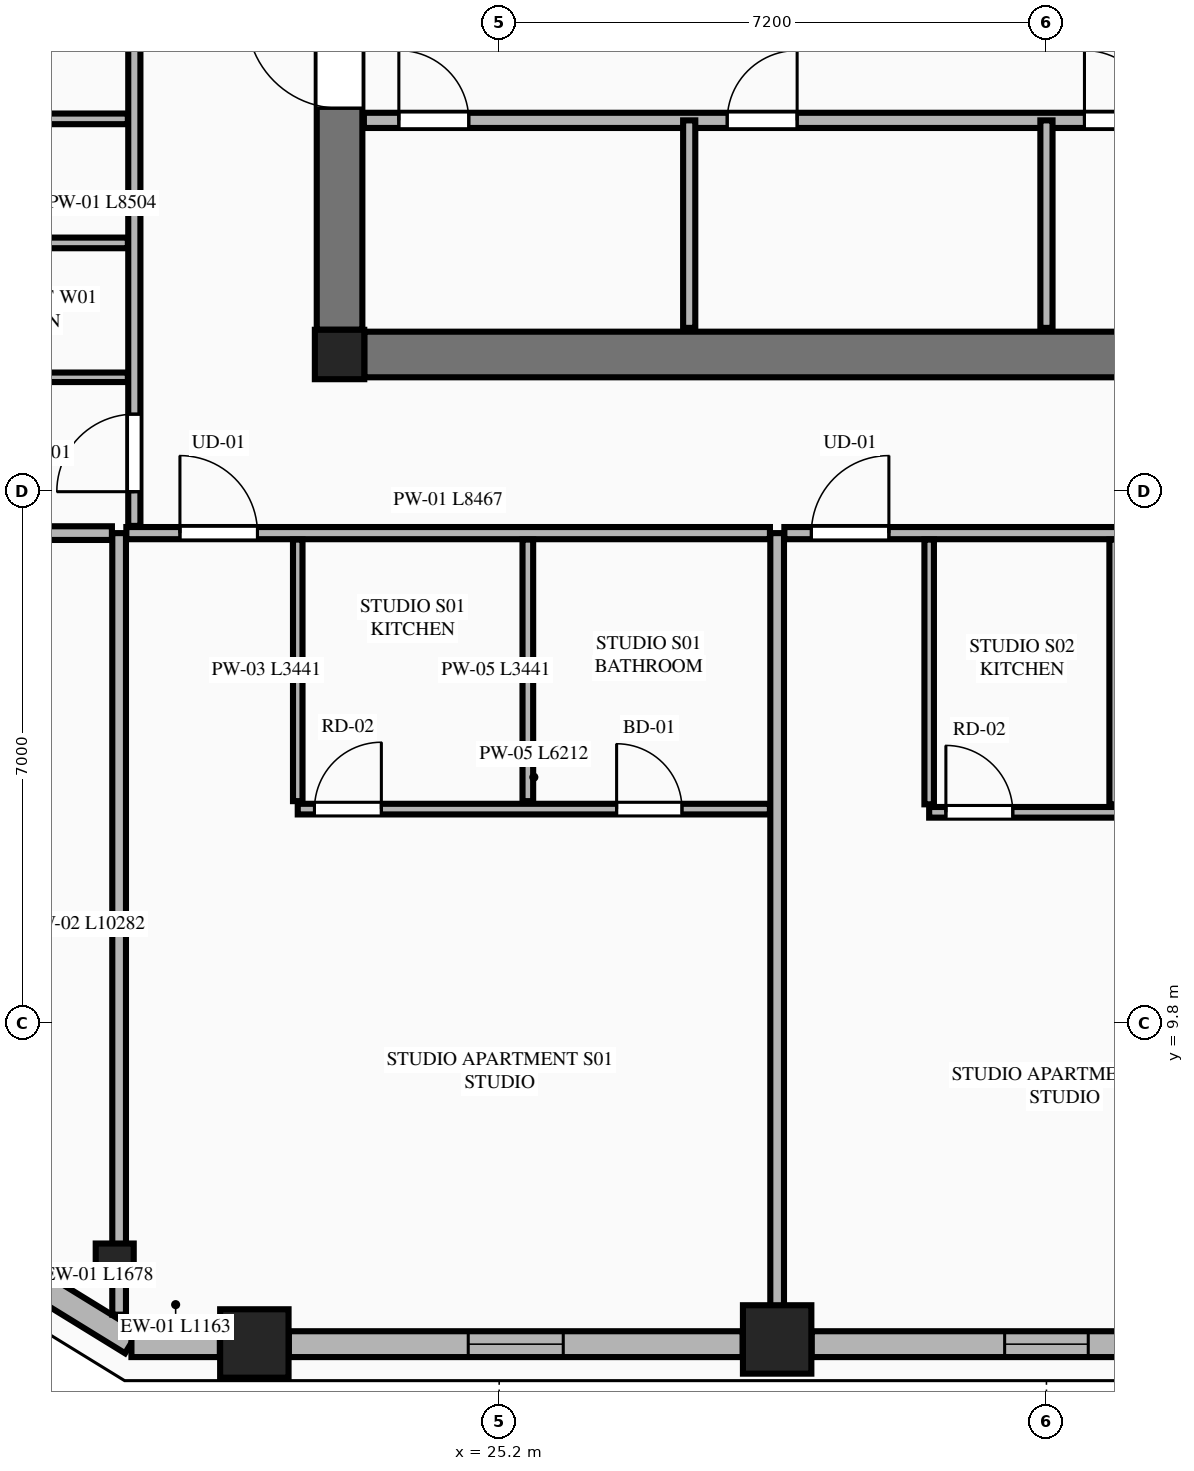
"""IFC4 building model, lengths in metres.
Left out: names, types, materials, properties, quantities, classifications, styles, units other than length and angle.
Written with IfcOpenShell. Run it as: python <this file> out.ifc"""

import sys

from ifc_helpers import new_model, si_unit, direction, frame, frame_2d, origin, origin_2d, place, context, subcontext, project, spatial, rectangle, extrude, element, fill, save


model = new_model("IFC4")
c1 = context("Model", 3, precision=1e-05, world=origin(), true_north=direction((0.0, 1.0)))
c2 = subcontext(c1, "Body", "Model", "MODEL_VIEW")
j1 = project(units=[si_unit("LENGTHUNIT", "METRE"), si_unit("PLANEANGLEUNIT", "RADIAN")], contexts=[c1])
p1 = place(None, origin())
s1 = spatial("IfcSite", under=j1, at=p1, CompositionType="ELEMENT")
p2 = place(p1, origin())
s2 = spatial("IfcBuilding", under=s1, at=p2, CompositionType="ELEMENT")
p3 = place(p2, frame((0.0, 0.0, 189.65)))
s3 = spatial("IfcBuildingStorey", under=s2, at=p3, CompositionType="ELEMENT", Elevation=189.65)
p4 = place(p3, frame((23.1, 18.6, 0.0), z_axis=(0.0, 0.0, 1.0), x_axis=(1.0, 0.0, 0.0)))
e1 = element("IfcColumn", 1, at=p4, inside=s3, PredefinedType="COLUMN", context=c2, shape_type="SweptSolid", body=[
    extrude(rectangle(XDim=0.65, YDim=0.65, at=origin_2d()), origin(), (0.0, 0.0, 1.0), 3.55),
])
p5 = place(p3, frame((23.425, 18.6, 0.0), z_axis=(0.0, 0.0, 1.0), x_axis=(1.0, 0.0, 0.0)))
e2 = element("IfcWall", 2, at=p5, inside=s3, PredefinedType="SHEAR", context=c2, shape_type="SweptSolid", body=[
    extrude(rectangle(XDim=17.95, YDim=0.6, at=frame_2d((8.975, 0.0))), origin(), (0.0, 0.0, 1.0), 3.35),
])
p6 = place(p3, frame((23.1, 18.925, 0.0), z_axis=(0.0, 0.0, 1.0), x_axis=(0.0, 1.0, 0.0)))
e3 = element("IfcWall", 3, at=p6, inside=s3, PredefinedType="SHEAR", context=c2, shape_type="SweptSolid", body=[
    extrude(rectangle(XDim=13.95, YDim=0.6, at=frame_2d((6.975, 0.0))), origin(), (0.0, 0.0, 1.0), 3.35),
])
p7 = place(p6, frame((2.915, 0.0, 0.0)))
e4 = element("IfcOpeningElement", 4, at=p7, cuts=e3, PredefinedType="OPENING", context=c2, shape_type="SweptSolid", body=[
    extrude(rectangle(XDim=1.22, YDim=2.25, at=frame_2d((0.61, 1.125))), frame((0.0, 0.31, 0.0), z_axis=(0.0, -1.0, 0.0), x_axis=(1.0, 0.0, 0.0)), (0.0, 0.0, 1.0), 0.62),
])
for number, where, z_axis, x_axis in (
    (5, (21.979, 5.589, 0.0), (0.0, 0.0, 1.0), (1.0, 0.0, 0.0)),
    (6, (28.857, 5.642, 0.0), (0.0, 0.0, 1.0), (1.0, 0.0, 0.0)),
):
    element("IfcColumn", number, at=place(p3, frame(where, z_axis=z_axis, x_axis=x_axis)), inside=s3, PredefinedType="COLUMN", context=c2, shape_type="SweptSolid", body=[
        extrude(rectangle(XDim=0.9, YDim=0.9, at=origin_2d()), origin(), (0.0, 0.0, 1.0), 3.55),
    ])
p8 = place(p3, frame((20.142, 6.654, 0.0), z_axis=(0.0, 0.0, 1.0), x_axis=(0.865230187018, -0.501374833306, 0.0)))
e7 = element("IfcColumn", 7, at=p8, inside=s3, PredefinedType="PILASTER", context=c2, shape_type="SweptSolid", body=[
    extrude(rectangle(XDim=0.5, YDim=0.35, at=origin_2d()), origin(), (0.0, 0.0, 1.0), 3.55),
])
p9 = place(p3, frame((23.42, 21.68, 0.0), z_axis=(0.0, 0.0, 1.0), x_axis=(1.0, 0.0, 0.0)))
e8 = element("IfcWall", 8, at=p9, inside=s3, PredefinedType="PLUMBINGWALL", context=c2, shape_type="SweptSolid", body=[
    extrude(rectangle(XDim=17.96, YDim=0.2, at=frame_2d((8.98, 0.0))), origin(), (0.0, 0.0, 1.0), 3.35),
])
p10 = place(p9, frame((0.46, 0.0, 0.0)))
e9 = element("IfcOpeningElement", 9, at=p10, cuts=e8, PredefinedType="OPENING", context=c2, shape_type="SweptSolid", body=[
    extrude(rectangle(XDim=0.92, YDim=2.15, at=frame_2d((0.46, 1.075))), frame((0.0, 0.11, 0.0), z_axis=(0.0, -1.0, 0.0), x_axis=(1.0, 0.0, 0.0)), (0.0, 0.0, 1.0), 0.22),
])
p11 = place(p9, frame((4.78, 0.0, 0.0)))
e10 = element("IfcOpeningElement", 10, at=p11, cuts=e8, PredefinedType="OPENING", context=c2, shape_type="SweptSolid", body=[
    extrude(rectangle(XDim=0.92, YDim=2.15, at=frame_2d((0.46, 1.075))), frame((0.0, 0.11, 0.0), z_axis=(0.0, -1.0, 0.0), x_axis=(1.0, 0.0, 0.0)), (0.0, 0.0, 1.0), 0.22),
])
p12 = place(p9, frame((9.48, 0.0, 0.0)))
e11 = element("IfcOpeningElement", 11, at=p12, cuts=e8, PredefinedType="OPENING", context=c2, shape_type="SweptSolid", body=[
    extrude(rectangle(XDim=0.92, YDim=2.15, at=frame_2d((0.46, 1.075))), frame((0.0, 0.11, 0.0), z_axis=(0.0, -1.0, 0.0), x_axis=(1.0, 0.0, 0.0)), (0.0, 0.0, 1.0), 0.22),
])
p13 = place(p9, frame((14.08, 0.0, 0.0)))
e12 = element("IfcOpeningElement", 12, at=p13, cuts=e8, PredefinedType="OPENING", context=c2, shape_type="SweptSolid", body=[
    extrude(rectangle(XDim=0.92, YDim=2.15, at=frame_2d((0.46, 1.075))), frame((0.0, 0.11, 0.0), z_axis=(0.0, -1.0, 0.0), x_axis=(1.0, 0.0, 0.0)), (0.0, 0.0, 1.0), 0.22),
])
for number, where, z_axis, x_axis in (
    (13, (27.7, 18.95, 0.0), (0.0, 0.0, 1.0), (0.0, 1.0, 0.0)),
    (14, (32.4, 18.95, 0.0), (0.0, 0.0, 1.0), (0.0, 1.0, 0.0)),
):
    element("IfcWall", number, at=place(p3, frame(where, z_axis=z_axis, x_axis=x_axis)), inside=s3, PredefinedType="PARTITIONING", context=c2, shape_type="SweptSolid", body=[
        extrude(rectangle(XDim=2.73, YDim=0.16, at=frame_2d((1.365, 0.0))), origin(), (0.0, 0.0, 1.0), 3.35),
    ])
p14 = place(p3, frame((18.938, 6.484, 0.0), z_axis=(0.0, 0.0, 1.0), x_axis=(0.851778214877, -0.523902541185, 0.0)))
e15 = element("IfcWall", 15, at=p14, inside=s3, PredefinedType="STANDARD", context=c2, shape_type="SweptSolid", body=[
    extrude(rectangle(XDim=1.678, YDim=0.34, at=frame_2d((0.839, 0.0))), origin(), (0.0, 0.0, 1.0), 3.35),
])
p15 = place(p3, frame((20.362, 5.58, 0.0), z_axis=(0.0, 0.0, 1.0), x_axis=(1.0, 0.0, 0.0)))
e16 = element("IfcWall", 16, at=p15, inside=s3, PredefinedType="STANDARD", context=c2, shape_type="SweptSolid", body=[
    extrude(rectangle(XDim=1.163, YDim=0.34, at=frame_2d((0.582, 0.0))), origin(), (0.0, 0.0, 1.0), 3.35),
])
p16 = place(p3, frame((22.433, 5.58, 0.0), z_axis=(0.0, 0.0, 1.0), x_axis=(1.0, 0.0, 0.0)))
e17 = element("IfcWall", 17, at=p16, inside=s3, PredefinedType="STANDARD", context=c2, shape_type="SweptSolid", body=[
    extrude(rectangle(XDim=5.97, YDim=0.34, at=frame_2d((2.985, 0.0))), origin(), (0.0, 0.0, 1.0), 2.883),
])
p17 = place(p16, frame((2.36, 0.0, 0.75)))
e18 = element("IfcOpeningElement", 18, at=p17, cuts=e17, PredefinedType="OPENING", context=c2, shape_type="SweptSolid", body=[
    extrude(rectangle(XDim=1.25, YDim=1.95, at=frame_2d((0.625, 0.975))), frame((0.0, 0.18, 0.0), z_axis=(0.0, -1.0, 0.0), x_axis=(1.0, 0.0, 0.0)), (0.0, 0.0, 1.0), 0.36),
])
p18 = place(p3, frame((29.311, 5.58, 0.0), z_axis=(0.0, 0.0, 1.0), x_axis=(1.0, 0.0, 0.0)))
e19 = element("IfcWall", 19, at=p18, inside=s3, PredefinedType="STANDARD", context=c2, shape_type="SweptSolid", body=[
    extrude(rectangle(XDim=6.178, YDim=0.34, at=frame_2d((3.089, 0.0))), origin(), (0.0, 0.0, 1.0), 2.883),
])
p19 = place(p18, frame((2.539, 0.0, 0.75)))
e20 = element("IfcOpeningElement", 20, at=p19, cuts=e19, PredefinedType="OPENING", context=c2, shape_type="SweptSolid", body=[
    extrude(rectangle(XDim=1.1, YDim=1.983, at=frame_2d((0.55, 0.991))), frame((0.0, 0.18, 0.0), z_axis=(0.0, -1.0, 0.0), x_axis=(1.0, 0.0, 0.0)), (0.0, 0.0, 1.0), 0.36),
])
p20 = place(p3, frame((20.2, 5.968, 0.0), z_axis=(0.0, 0.0, 1.0), x_axis=(0.0, 1.0, 0.0)))
e21 = element("IfcWall", 21, at=p20, inside=s3, PredefinedType="PARTITIONING", context=c2, shape_type="SweptSolid", body=[
    extrude(rectangle(XDim=10.282, YDim=0.18, at=frame_2d((5.141, 0.0))), origin(), (0.0, 0.0, 1.0), 3.35),
])
p21 = place(p3, frame((28.857, 5.755, 0.0), z_axis=(0.0, 0.0, 1.0), x_axis=(0.0, 1.0, 0.0)))
e22 = element("IfcWall", 22, at=p21, inside=s3, PredefinedType="PARTITIONING", context=c2, shape_type="SweptSolid", body=[
    extrude(rectangle(XDim=10.495, YDim=0.18, at=frame_2d((5.248, 0.0))), origin(), (0.0, 0.0, 1.0), 2.807),
])
p22 = place(p3, frame((20.295, 16.25, 0.0), z_axis=(0.0, 0.0, 1.0), x_axis=(1.0, 0.0, 0.0)))
e23 = element("IfcWall", 23, at=p22, inside=s3, PredefinedType="PARTITIONING", context=c2, shape_type="SweptSolid", body=[
    extrude(rectangle(XDim=8.467, YDim=0.16, at=frame_2d((4.233, 0.0))), origin(), (0.0, 0.0, 1.0), 3.35),
])
p23 = place(p22, frame((0.705, 0.0, 0.0)))
e24 = element("IfcOpeningElement", 24, at=p23, cuts=e23, PredefinedType="OPENING", context=c2, shape_type="SweptSolid", body=[
    extrude(rectangle(XDim=1.02, YDim=2.25, at=frame_2d((0.51, 1.125))), frame((0.0, 0.09, 0.0), z_axis=(0.0, -1.0, 0.0), x_axis=(1.0, 0.0, 0.0)), (0.0, 0.0, 1.0), 0.18),
])
p24 = place(p3, frame((22.55, 12.724, 0.0), z_axis=(0.0, 0.0, 1.0), x_axis=(0.0, 1.0, 0.0)))
e25 = element("IfcWall", 25, at=p24, inside=s3, PredefinedType="PARTITIONING", context=c2, shape_type="SweptSolid", body=[
    extrude(rectangle(XDim=3.441, YDim=0.125, at=frame_2d((1.72, 0.0))), origin(), (0.0, 0.0, 1.0), 2.807),
])
p25 = place(p3, frame((22.55, 12.619, 0.0), z_axis=(0.0, 0.0, 1.0), x_axis=(1.0, 0.0, 0.0)))
e26 = element("IfcWall", 26, at=p25, inside=s3, PredefinedType="PLUMBINGWALL", context=c2, shape_type="SweptSolid", body=[
    extrude(rectangle(XDim=6.212, YDim=0.14, at=frame_2d((3.106, 0.0))), origin(), (0.0, 0.0, 1.0), 3.35),
])
p26 = place(p25, frame((4.195, 0.0, 0.0)))
e27 = element("IfcOpeningElement", 27, at=p26, cuts=e26, PredefinedType="OPENING", context=c2, shape_type="SweptSolid", body=[
    extrude(rectangle(XDim=0.86, YDim=2.1, at=frame_2d((0.43, 1.05))), frame((0.0, 0.08, 0.0), z_axis=(0.0, -1.0, 0.0), x_axis=(1.0, 0.0, 0.0)), (0.0, 0.0, 1.0), 0.16),
])
p27 = place(p25, frame((0.22, 0.0, 0.0)))
e28 = element("IfcOpeningElement", 28, at=p27, cuts=e26, PredefinedType="OPENING", context=c2, shape_type="SweptSolid", body=[
    extrude(rectangle(XDim=0.88, YDim=2.15, at=frame_2d((0.44, 1.075))), frame((0.0, 0.08, 0.0), z_axis=(0.0, -1.0, 0.0), x_axis=(1.0, 0.0, 0.0)), (0.0, 0.0, 1.0), 0.16),
])
p28 = place(p3, frame((25.577, 12.724, 0.0), z_axis=(0.0, 0.0, 1.0), x_axis=(0.0, 1.0, 0.0)))
e29 = element("IfcWall", 29, at=p28, inside=s3, PredefinedType="PLUMBINGWALL", context=c2, shape_type="SweptSolid", body=[
    extrude(rectangle(XDim=3.441, YDim=0.14, at=frame_2d((1.72, 0.0))), origin(), (0.0, 0.0, 1.0), 3.35),
])
p29 = place(p3, frame((28.952, 16.25, 0.0), z_axis=(0.0, 0.0, 1.0), x_axis=(1.0, 0.0, 0.0)))
e30 = element("IfcWall", 30, at=p29, inside=s3, PredefinedType="PARTITIONING", context=c2, shape_type="SweptSolid", body=[
    extrude(rectangle(XDim=6.896, YDim=0.16, at=frame_2d((3.448, 0.0))), origin(), (0.0, 0.0, 1.0), 3.35),
])
p30 = place(p29, frame((0.355, 0.0, 0.0)))
e31 = element("IfcOpeningElement", 31, at=p30, cuts=e30, PredefinedType="OPENING", context=c2, shape_type="SweptSolid", body=[
    extrude(rectangle(XDim=1.02, YDim=2.25, at=frame_2d((0.51, 1.125))), frame((0.0, 0.09, 0.0), z_axis=(0.0, -1.0, 0.0), x_axis=(1.0, 0.0, 0.0)), (0.0, 0.0, 1.0), 0.18),
])
p31 = place(p3, frame((30.857, 12.682, 0.0), z_axis=(0.0, 0.0, 1.0), x_axis=(0.0, 1.0, 0.0)))
e32 = element("IfcWall", 32, at=p31, inside=s3, PredefinedType="PARTITIONING", context=c2, shape_type="SweptSolid", body=[
    extrude(rectangle(XDim=3.483, YDim=0.125, at=frame_2d((1.742, 0.0))), origin(), (0.0, 0.0, 1.0), 3.35),
])
p32 = place(p3, frame((30.857, 12.577, 0.0), z_axis=(0.0, 0.0, 1.0), x_axis=(1.0, 0.0, 0.0)))
e33 = element("IfcWall", 33, at=p32, inside=s3, PredefinedType="PLUMBINGWALL", context=c2, shape_type="SweptSolid", body=[
    extrude(rectangle(XDim=4.991, YDim=0.14, at=frame_2d((2.496, 0.0))), origin(), (0.0, 0.0, 1.0), 3.35),
])
p33 = place(p32, frame((3.291, 0.0, 0.0)))
e34 = element("IfcOpeningElement", 34, at=p33, cuts=e33, PredefinedType="OPENING", context=c2, shape_type="SweptSolid", body=[
    extrude(rectangle(XDim=0.86, YDim=2.1, at=frame_2d((0.43, 1.05))), frame((0.0, 0.08, 0.0), z_axis=(0.0, -1.0, 0.0), x_axis=(1.0, 0.0, 0.0)), (0.0, 0.0, 1.0), 0.16),
])
p34 = place(p32, frame((0.22, 0.0, 0.0)))
e35 = element("IfcOpeningElement", 35, at=p34, cuts=e33, PredefinedType="OPENING", context=c2, shape_type="SweptSolid", body=[
    extrude(rectangle(XDim=0.88, YDim=2.15, at=frame_2d((0.44, 1.075))), frame((0.0, 0.08, 0.0), z_axis=(0.0, -1.0, 0.0), x_axis=(1.0, 0.0, 0.0)), (0.0, 0.0, 1.0), 0.16),
])
p35 = place(p3, frame((33.298, 12.682, 0.0), z_axis=(0.0, 0.0, 1.0), x_axis=(0.0, 1.0, 0.0)))
e36 = element("IfcWall", 36, at=p35, inside=s3, PredefinedType="PLUMBINGWALL", context=c2, shape_type="SweptSolid", body=[
    extrude(rectangle(XDim=3.483, YDim=0.14, at=frame_2d((1.742, 0.0))), origin(), (0.0, 0.0, 1.0), 3.35),
])
p36 = place(p3, frame((14.211, 16.25, 0.0), z_axis=(0.0, 0.0, 1.0), x_axis=(1.0, 0.0, 0.0)))
e37 = element("IfcWall", 37, at=p36, inside=s3, PredefinedType="PARTITIONING", context=c2, shape_type="SweptSolid", body=[
    extrude(rectangle(XDim=5.894, YDim=0.18, at=frame_2d((2.947, 0.0))), origin(), (0.0, 0.0, 1.0), 3.35),
])
p37 = place(p3, frame((20.4, 16.345, 0.0), z_axis=(0.0, 0.0, 1.0), x_axis=(0.0, 1.0, 0.0)))
e38 = element("IfcWall", 38, at=p37, inside=s3, PredefinedType="PARTITIONING", context=c2, shape_type="SweptSolid", body=[
    extrude(rectangle(XDim=8.504, YDim=0.16, at=frame_2d((4.252, 0.0))), origin(), (0.0, 0.0, 1.0), 3.35),
])
p38 = place(p37, frame((0.45, 0.0, 0.0)))
e39 = element("IfcOpeningElement", 39, at=p38, cuts=e38, PredefinedType="OPENING", context=c2, shape_type="SweptSolid", body=[
    extrude(rectangle(XDim=1.02, YDim=2.25, at=frame_2d((0.51, 1.125))), frame((0.0, 0.09, 0.0), z_axis=(0.0, -1.0, 0.0), x_axis=(1.0, 0.0, 0.0)), (0.0, 0.0, 1.0), 0.18),
])
p39 = place(p3, frame((17.035, 18.3, 0.0), z_axis=(0.0, 0.0, 1.0), x_axis=(1.0, 0.0, 0.0)))
e40 = element("IfcWall", 40, at=p39, inside=s3, PredefinedType="PARTITIONING", context=c2, shape_type="SweptSolid", body=[
    extrude(rectangle(XDim=3.28, YDim=0.125, at=frame_2d((1.64, 0.0))), origin(), (0.0, 0.0, 1.0), 2.807),
])
for number, where, z_axis, x_axis in (
    (41, (17.035, 21.7, 0.0), (0.0, 0.0, 1.0), (1.0, 0.0, 0.0)),
    (42, (17.035, 20.068, 0.0), (0.0, 0.0, 1.0), (1.0, 0.0, 0.0)),
):
    element("IfcWall", number, at=place(p3, frame(where, z_axis=z_axis, x_axis=x_axis)), inside=s3, PredefinedType="PLUMBINGWALL", context=c2, shape_type="SweptSolid", body=[
        extrude(rectangle(XDim=3.28, YDim=0.14, at=frame_2d((1.64, 0.0))), origin(), (0.0, 0.0, 1.0), 3.35),
    ])
p40 = place(p7, origin())
e43 = element("IfcDoor", 43, at=p40, inside=s3, OperationType="SINGLE_SWING_RIGHT", PredefinedType="DOOR", context=c2, shape_type="SweptSolid", body=[
    extrude(rectangle(XDim=1.22, YDim=2.25, at=frame_2d((0.61, 1.125))), frame((0.0, 0.025, 0.0), z_axis=(0.0, -1.0, 0.0), x_axis=(1.0, 0.0, 0.0)), (0.0, 0.0, 1.0), 0.05),
])
fill(e4, e43)
p41 = place(p10, origin())
e44 = element("IfcDoor", 44, at=p41, inside=s3, OperationType="SINGLE_SWING_LEFT", PredefinedType="DOOR", context=c2, shape_type="SweptSolid", body=[
    extrude(rectangle(XDim=0.92, YDim=2.15, at=frame_2d((0.46, 1.075))), frame((0.0, 0.025, 0.0), z_axis=(0.0, -1.0, 0.0), x_axis=(1.0, 0.0, 0.0)), (0.0, 0.0, 1.0), 0.05),
])
fill(e9, e44)
p42 = place(p11, origin())
e45 = element("IfcDoor", 45, at=p42, inside=s3, OperationType="SINGLE_SWING_RIGHT", PredefinedType="DOOR", context=c2, shape_type="SweptSolid", body=[
    extrude(rectangle(XDim=0.92, YDim=2.15, at=frame_2d((0.46, 1.075))), frame((0.0, 0.025, 0.0), z_axis=(0.0, -1.0, 0.0), x_axis=(1.0, 0.0, 0.0)), (0.0, 0.0, 1.0), 0.05),
])
fill(e10, e45)
p43 = place(p12, origin())
e46 = element("IfcDoor", 46, at=p43, inside=s3, OperationType="SINGLE_SWING_LEFT", PredefinedType="DOOR", context=c2, shape_type="SweptSolid", body=[
    extrude(rectangle(XDim=0.92, YDim=2.15, at=frame_2d((0.46, 1.075))), frame((0.0, 0.025, 0.0), z_axis=(0.0, -1.0, 0.0), x_axis=(1.0, 0.0, 0.0)), (0.0, 0.0, 1.0), 0.05),
])
fill(e11, e46)
p44 = place(p17, origin())
e47 = element("IfcWindow", 47, at=p44, inside=s3, PartitioningType="SINGLE_PANEL", PredefinedType="WINDOW", context=c2, shape_type="SweptSolid", body=[
    extrude(rectangle(XDim=1.25, YDim=1.95, at=frame_2d((0.625, 0.975))), frame((0.0, 0.03, 0.0), z_axis=(0.0, -1.0, 0.0), x_axis=(1.0, 0.0, 0.0)), (0.0, 0.0, 1.0), 0.06),
])
fill(e18, e47)
p45 = place(p19, origin())
e48 = element("IfcWindow", 48, at=p45, inside=s3, PartitioningType="SINGLE_PANEL", PredefinedType="WINDOW", context=c2, shape_type="SweptSolid", body=[
    extrude(rectangle(XDim=1.1, YDim=1.983, at=frame_2d((0.55, 0.991))), frame((0.0, 0.03, 0.0), z_axis=(0.0, -1.0, 0.0), x_axis=(1.0, 0.0, 0.0)), (0.0, 0.0, 1.0), 0.06),
])
fill(e20, e48)
p46 = place(p26, origin())
e49 = element("IfcDoor", 49, at=p46, inside=s3, OperationType="SINGLE_SWING_LEFT", PredefinedType="DOOR", context=c2, shape_type="SweptSolid", body=[
    extrude(rectangle(XDim=0.86, YDim=2.1, at=frame_2d((0.43, 1.05))), frame((0.0, 0.025, 0.0), z_axis=(0.0, -1.0, 0.0), x_axis=(1.0, 0.0, 0.0)), (0.0, 0.0, 1.0), 0.05),
])
fill(e27, e49)
p47 = place(p23, origin())
e50 = element("IfcDoor", 50, at=p47, inside=s3, OperationType="SINGLE_SWING_LEFT", PredefinedType="DOOR", context=c2, shape_type="SweptSolid", body=[
    extrude(rectangle(XDim=1.02, YDim=2.25, at=frame_2d((0.51, 1.125))), frame((0.0, 0.025, 0.0), z_axis=(0.0, -1.0, 0.0), x_axis=(1.0, 0.0, 0.0)), (0.0, 0.0, 1.0), 0.05),
])
fill(e24, e50)
p48 = place(p27, origin())
e51 = element("IfcDoor", 51, at=p48, inside=s3, OperationType="SINGLE_SWING_RIGHT", PredefinedType="DOOR", context=c2, shape_type="SweptSolid", body=[
    extrude(rectangle(XDim=0.88, YDim=2.15, at=frame_2d((0.44, 1.075))), frame((0.0, 0.025, 0.0), z_axis=(0.0, -1.0, 0.0), x_axis=(1.0, 0.0, 0.0)), (0.0, 0.0, 1.0), 0.05),
])
fill(e28, e51)
p49 = place(p30, origin())
e52 = element("IfcDoor", 52, at=p49, inside=s3, OperationType="SINGLE_SWING_RIGHT", PredefinedType="DOOR", context=c2, shape_type="SweptSolid", body=[
    extrude(rectangle(XDim=1.02, YDim=2.25, at=frame_2d((0.51, 1.125))), frame((0.0, 0.025, 0.0), z_axis=(0.0, -1.0, 0.0), x_axis=(1.0, 0.0, 0.0)), (0.0, 0.0, 1.0), 0.05),
])
fill(e31, e52)
p50 = place(p34, origin())
e53 = element("IfcDoor", 53, at=p50, inside=s3, OperationType="SINGLE_SWING_LEFT", PredefinedType="DOOR", context=c2, shape_type="SweptSolid", body=[
    extrude(rectangle(XDim=0.88, YDim=2.15, at=frame_2d((0.44, 1.075))), frame((0.0, 0.025, 0.0), z_axis=(0.0, -1.0, 0.0), x_axis=(1.0, 0.0, 0.0)), (0.0, 0.0, 1.0), 0.05),
])
fill(e35, e53)
p51 = place(p38, origin())
e54 = element("IfcDoor", 54, at=p51, inside=s3, OperationType="SINGLE_SWING_LEFT", PredefinedType="DOOR", context=c2, shape_type="SweptSolid", body=[
    extrude(rectangle(XDim=1.02, YDim=2.25, at=frame_2d((0.51, 1.125))), frame((0.0, 0.025, 0.0), z_axis=(0.0, -1.0, 0.0), x_axis=(1.0, 0.0, 0.0)), (0.0, 0.0, 1.0), 0.05),
])
fill(e39, e54)
save(model, sys.argv[1])
